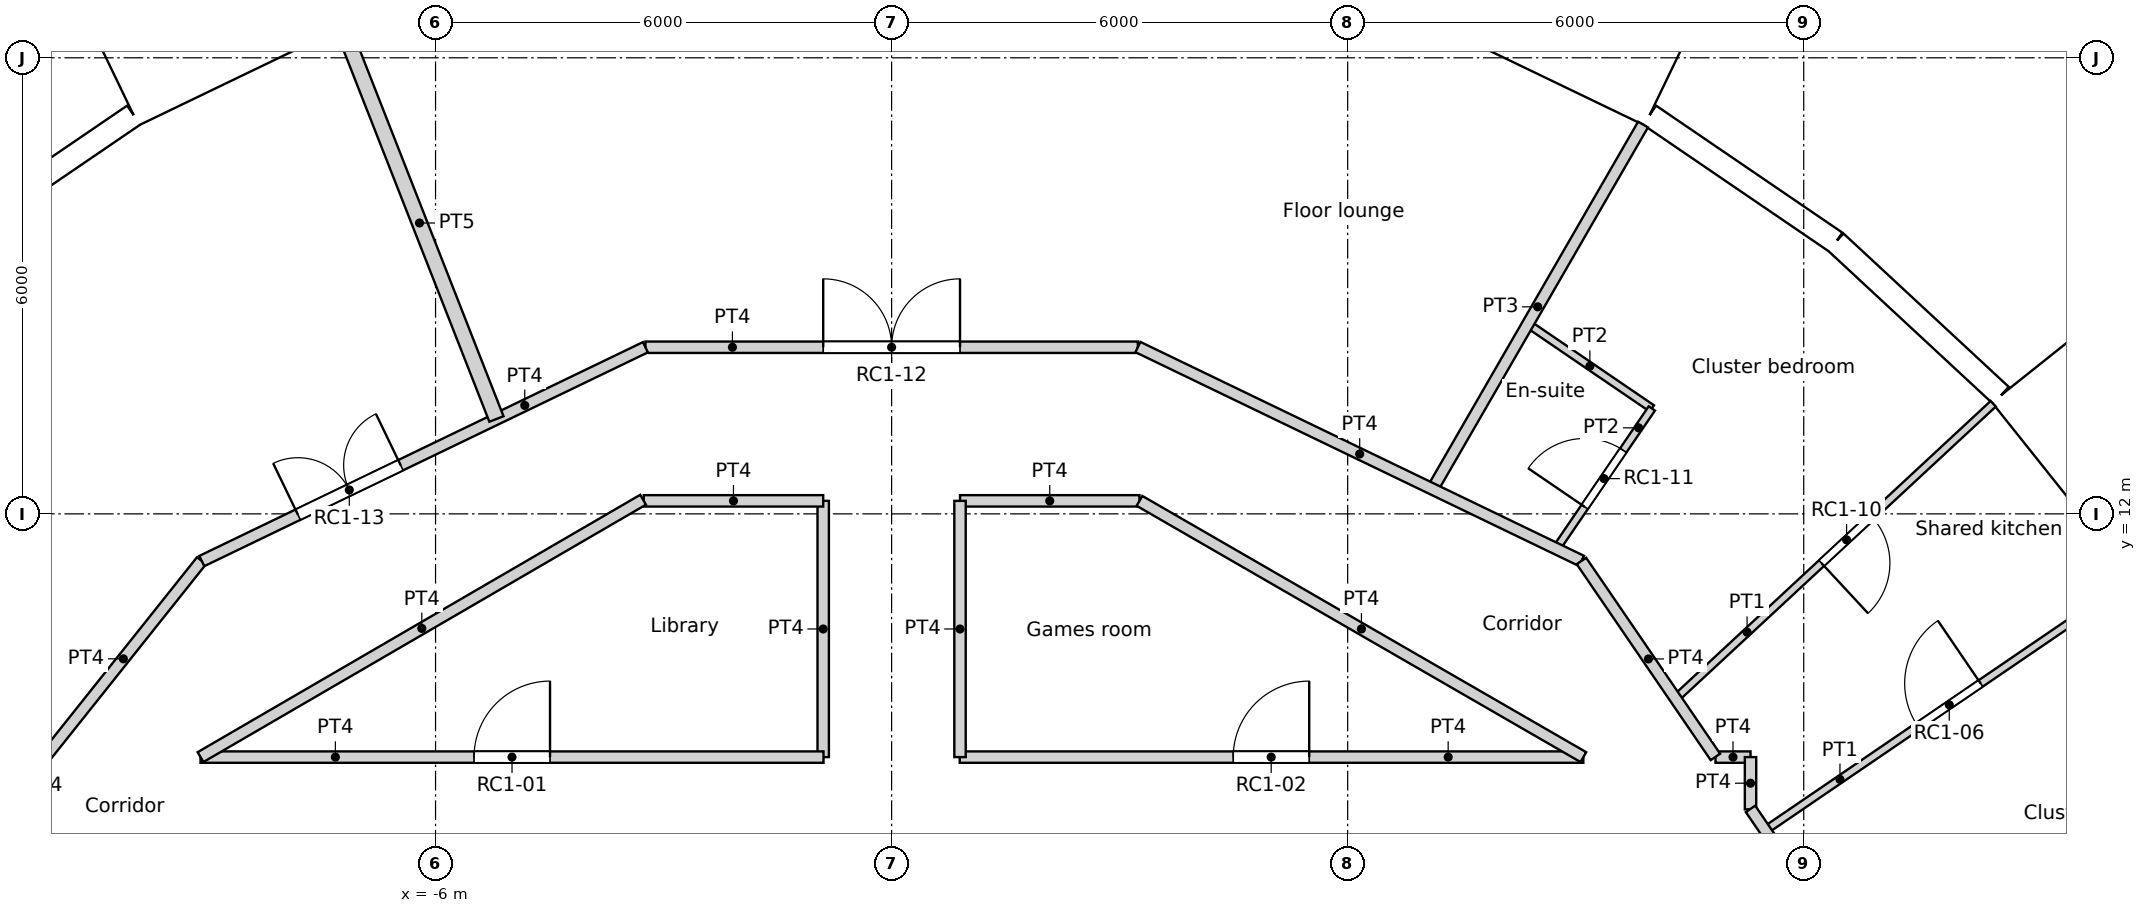
"""IFC4 building model, lengths in metres.
Left out: names, types, materials, properties, quantities, classifications, styles, units other than length and angle.
Written with IfcOpenShell. Run it as: python <this file> out.ifc"""

import sys

from ifc_helpers import new_model, si_unit, direction, frame, frame_2d, origin, origin_2d, place, context, subcontext, project, spatial, rectangle, circle, extrude, element, fill, save


model = new_model("IFC4")
c1 = context("Model", 3, precision=1e-05, world=origin(), true_north=direction((0.0, 1.0)))
c2 = subcontext(c1, "Body", "Model", "MODEL_VIEW")
j1 = project(units=[si_unit("LENGTHUNIT", "METRE"), si_unit("PLANEANGLEUNIT", "RADIAN")], contexts=[c1])
p1 = place(None, origin())
s1 = spatial("IfcSite", under=j1, at=p1, CompositionType="ELEMENT")
p2 = place(p1, origin())
s2 = spatial("IfcBuilding", under=s1, at=p2, CompositionType="ELEMENT")
p3 = place(p2, frame((0.0, 0.0, 231.0)))
s3 = spatial("IfcBuildingStorey", under=s2, at=p3, CompositionType="ELEMENT", Elevation=231.0)
for number, where, z_axis, x_axis in (
    (1, (15.552, 10.603, 0.0), (0.0, 0.0, 1.0), (1.0, 0.0, 0.0)),
    (2, (11.735, 14.716, 0.0), (0.0, 0.0, 1.0), (1.0, 0.0, 0.0)),
    (3, (6.876, 17.521, 0.0), (0.0, 0.0, 1.0), (1.0, 0.0, 0.0)),
    (4, (-4.188, 18.35, 0.0), (0.0, 0.0, 1.0), (1.0, 0.0, 0.0)),
    (5, (-9.411, 16.301, 0.0), (0.0, 0.0, 1.0), (1.0, 0.0, 0.0)),
):
    element("IfcColumn", number, at=place(p3, frame(where, z_axis=z_axis, x_axis=x_axis)), inside=s3, PredefinedType="COLUMN", context=c2, shape_type="SweptSolid", body=[
        extrude(circle(Radius=0.55, at=origin_2d()), origin(), (0.0, 0.0, 1.0), 3.6),
    ])
p4 = place(p3, frame((16.917, 11.572, -0.35), z_axis=(0.0, 0.0, 1.0), x_axis=(-0.623523286312, 0.781804778335, 0.0)))
e6 = element("IfcWall", 6, at=p4, inside=s3, PredefinedType="ELEMENTEDWALL", context=c2, shape_type="SweptSolid", body=[
    extrude(rectangle(XDim=3.0, YDim=1.45, at=frame_2d((1.5, 0.0))), origin(), (0.0, 0.0, 1.0), 3.6),
])
p5 = place(p4, frame((1.5, 0.0, 1.9)))
e7 = element("IfcOpeningElement", 7, at=p5, cuts=e6, PredefinedType="OPENING", context=c2, shape_type="SweptSolid", body=[
    extrude(circle(Radius=0.9, at=origin_2d()), frame((0.0, 0.735, 0.0), z_axis=(0.0, -1.0, 0.0), x_axis=(1.0, 0.0, 0.0)), (0.0, 0.0, 1.0), 1.47),
])
p6 = place(p3, frame((14.593, 13.561, 0.0), z_axis=(0.0, 0.0, 1.0), x_axis=(-0.733028283666, 0.680198158882, 0.0)))
e8 = element("IfcWall", 8, at=p6, inside=s3, PredefinedType="SOLIDWALL", context=c2, shape_type="SweptSolid", body=[
    extrude(rectangle(XDim=2.962, YDim=0.3, at=frame_2d((1.481, 0.0))), origin(), (0.0, 0.0, 1.0), 2.8),
])
p7 = place(p6, frame((1.481, 0.0, 1.55)))
e9 = element("IfcOpeningElement", 9, at=p7, cuts=e8, PredefinedType="OPENING", context=c2, shape_type="SweptSolid", body=[
    extrude(circle(Radius=0.9, at=origin_2d()), frame((0.0, 0.16, 0.0), z_axis=(0.0, -1.0, 0.0), x_axis=(1.0, 0.0, 0.0)), (0.0, 0.0, 1.0), 0.32),
])
p8 = place(p3, frame((12.421, 15.575, 0.0), z_axis=(0.0, 0.0, 1.0), x_axis=(-0.826236061068, 0.563324037646, 0.0)))
e10 = element("IfcWall", 10, at=p8, inside=s3, PredefinedType="SOLIDWALL", context=c2, shape_type="SweptSolid", body=[
    extrude(rectangle(XDim=2.962, YDim=0.3, at=frame_2d((1.481, 0.0))), origin(), (0.0, 0.0, 1.0), 3.25),
])
p9 = place(p8, frame((1.481, 0.0, 1.55)))
e11 = element("IfcOpeningElement", 11, at=p9, cuts=e10, PredefinedType="OPENING", context=c2, shape_type="SweptSolid", body=[
    extrude(circle(Radius=0.9, at=origin_2d()), frame((0.0, 0.16, 0.0), z_axis=(0.0, -1.0, 0.0), x_axis=(1.0, 0.0, 0.0)), (0.0, 0.0, 1.0), 0.32),
])
p10 = place(p3, frame((10.22, 17.766, -0.35), z_axis=(0.0, 0.0, 1.0), x_axis=(-0.900953362039, 0.433915935904, 0.0)))
e12 = element("IfcWall", 12, at=p10, inside=s3, PredefinedType="ELEMENTEDWALL", context=c2, shape_type="SweptSolid", body=[
    extrude(rectangle(XDim=3.0, YDim=1.45, at=frame_2d((1.5, 0.0))), origin(), (0.0, 0.0, 1.0), 3.6),
])
p11 = place(p10, frame((1.5, 0.0, 1.9)))
e13 = element("IfcOpeningElement", 13, at=p11, cuts=e12, PredefinedType="OPENING", context=c2, shape_type="SweptSolid", body=[
    extrude(circle(Radius=0.9, at=origin_2d()), frame((0.0, 0.735, 0.0), z_axis=(0.0, -1.0, 0.0), x_axis=(1.0, 0.0, 0.0)), (0.0, 0.0, 1.0), 1.47),
])
p12 = place(p3, frame((-7.518, 19.068, -0.35), z_axis=(0.0, 0.0, 1.0), x_axis=(-0.900953362039, -0.433915935904, 0.0)))
e14 = element("IfcWall", 14, at=p12, inside=s3, PredefinedType="ELEMENTEDWALL", context=c2, shape_type="SweptSolid", body=[
    extrude(rectangle(XDim=3.0, YDim=1.45, at=frame_2d((1.5, 0.0))), origin(), (0.0, 0.0, 1.0), 3.6),
])
p13 = place(p12, frame((1.5, 0.0, 1.9)))
e15 = element("IfcOpeningElement", 15, at=p13, cuts=e14, PredefinedType="OPENING", context=c2, shape_type="SweptSolid", body=[
    extrude(circle(Radius=0.9, at=origin_2d()), frame((0.0, 0.735, 0.0), z_axis=(0.0, -1.0, 0.0), x_axis=(1.0, 0.0, 0.0)), (0.0, 0.0, 1.0), 1.47),
])
p14 = place(p3, frame((-9.974, 17.244, 0.0), z_axis=(0.0, 0.0, 1.0), x_axis=(-0.826236061068, -0.563324037646, 0.0)))
e16 = element("IfcWall", 16, at=p14, inside=s3, PredefinedType="SOLIDWALL", context=c2, shape_type="SweptSolid", body=[
    extrude(rectangle(XDim=2.962, YDim=0.3, at=frame_2d((1.481, 0.0))), origin(), (0.0, 0.0, 1.0), 2.8),
])
p15 = place(p14, frame((1.481, 0.0, 1.55)))
e17 = element("IfcOpeningElement", 17, at=p15, cuts=e16, PredefinedType="OPENING", context=c2, shape_type="SweptSolid", body=[
    extrude(circle(Radius=0.9, at=origin_2d()), frame((0.0, 0.16, 0.0), z_axis=(0.0, -1.0, 0.0), x_axis=(1.0, 0.0, 0.0)), (0.0, 0.0, 1.0), 0.32),
])
p16 = place(p3, frame((-9.092, 8.8, 0.0), z_axis=(0.0, 0.0, 1.0), x_axis=(0.864470922103, 0.502682827277, 0.0)))
e18 = element("IfcWall", 18, at=p16, inside=s3, PredefinedType="PARTITIONING", context=c2, shape_type="SweptSolid", body=[
    extrude(rectangle(XDim=6.735, YDim=0.15, at=frame_2d((3.368, 0.0))), origin(), (0.0, 0.0, 1.0), 3.25),
])
p17 = place(p3, frame((-9.092, 8.8, 0.0), z_axis=(0.0, 0.0, 1.0), x_axis=(1.0, 0.0, 0.0)))
e19 = element("IfcWall", 19, at=p17, inside=s3, PredefinedType="PARTITIONING", context=c2, shape_type="SweptSolid", body=[
    extrude(rectangle(XDim=8.196, YDim=0.15, at=frame_2d((4.098, 0.0))), origin(), (0.0, 0.0, 1.0), 3.25),
])
p18 = place(p17, frame((3.598, 0.0, 0.0)))
e20 = element("IfcOpeningElement", 20, at=p18, cuts=e19, PredefinedType="OPENING", context=c2, shape_type="SweptSolid", body=[
    extrude(rectangle(XDim=1.0, YDim=2.04, at=frame_2d((0.5, 1.02))), frame((0.0, 0.075, 0.0), z_axis=(0.0, -1.0, 0.0), x_axis=(1.0, 0.0, 0.0)), (0.0, 0.0, 1.0), 0.15),
])
p19 = place(p3, frame((0.896, 8.8, 0.0), z_axis=(0.0, 0.0, 1.0), x_axis=(1.0, 0.0, 0.0)))
e21 = element("IfcWall", 21, at=p19, inside=s3, PredefinedType="PARTITIONING", context=c2, shape_type="SweptSolid", body=[
    extrude(rectangle(XDim=8.205, YDim=0.15, at=frame_2d((4.102, 0.0))), origin(), (0.0, 0.0, 1.0), 3.25),
])
p20 = place(p19, frame((3.598, 0.0, 0.0)))
e22 = element("IfcOpeningElement", 22, at=p20, cuts=e21, PredefinedType="OPENING", context=c2, shape_type="SweptSolid", body=[
    extrude(rectangle(XDim=1.0, YDim=2.04, at=frame_2d((0.5, 1.02))), frame((0.0, 0.075, 0.0), z_axis=(0.0, -1.0, 0.0), x_axis=(1.0, 0.0, 0.0)), (0.0, 0.0, 1.0), 0.15),
])
p21 = place(p3, frame((9.075, 11.381, 0.0), z_axis=(0.0, 0.0, 1.0), x_axis=(0.564277533473, -0.825585165333, 0.0)))
e23 = element("IfcWall", 23, at=p21, inside=s3, PredefinedType="PARTITIONING", context=c2, shape_type="SweptSolid", body=[
    extrude(rectangle(XDim=3.123, YDim=0.15, at=frame_2d((1.562, 0.0))), origin(), (0.0, 0.0, 1.0), 3.25),
])
p22 = place(p3, frame((10.839, 8.8, 0.0), z_axis=(0.0, 0.0, 1.0), x_axis=(1.0, 0.0, 0.0)))
e24 = element("IfcWall", 24, at=p22, inside=s3, PredefinedType="PARTITIONING", context=c2, shape_type="SweptSolid", body=[
    extrude(rectangle(XDim=0.461, YDim=0.15, at=frame_2d((0.23, 0.0))), origin(), (0.0, 0.0, 1.0), 3.25),
])
p23 = place(p3, frame((11.3, 8.113, 0.0), z_axis=(0.0, 0.0, 1.0), x_axis=(0.0, 1.0, 0.0)))
e25 = element("IfcWall", 25, at=p23, inside=s3, PredefinedType="PARTITIONING", context=c2, shape_type="SweptSolid", body=[
    extrude(rectangle(XDim=0.687, YDim=0.15, at=frame_2d((0.344, 0.0))), origin(), (0.0, 0.0, 1.0), 3.25),
])
p24 = place(p3, frame((-11.136, 8.802, 0.0), z_axis=(0.0, 0.0, 1.0), x_axis=(0.623151397235, 0.782101231379, 0.0)))
e26 = element("IfcWall", 26, at=p24, inside=s3, PredefinedType="PARTITIONING", context=c2, shape_type="SweptSolid", body=[
    extrude(rectangle(XDim=3.301, YDim=0.15, at=frame_2d((1.65, 0.0))), origin(), (0.0, 0.0, 1.0), 3.25),
])
p25 = place(p3, frame((11.3, 8.119, 0.0), z_axis=(0.0, 0.0, 1.0), x_axis=(0.56348561488, -0.82612587529, 0.0)))
e27 = element("IfcWall", 27, at=p25, inside=s3, PredefinedType="PARTITIONING", context=c2, shape_type="SweptSolid", body=[
    extrude(rectangle(XDim=4.633, YDim=0.15, at=frame_2d((2.316, 0.0))), origin(), (0.0, 0.0, 1.0), 3.25),
])
p26 = place(p25, frame((1.413, 0.0, 0.0)))
e28 = element("IfcOpeningElement", 28, at=p26, cuts=e27, PredefinedType="OPENING", context=c2, shape_type="SweptSolid", body=[
    extrude(rectangle(XDim=1.1, YDim=2.1, at=frame_2d((0.55, 1.05))), frame((0.0, 0.075, 0.0), z_axis=(0.0, -1.0, 0.0), x_axis=(1.0, 0.0, 0.0)), (0.0, 0.0, 1.0), 0.15),
])
p27 = place(p3, frame((-0.9, 8.8, 0.0), z_axis=(0.0, 0.0, 1.0), x_axis=(0.0, 1.0, 0.0)))
e29 = element("IfcWall", 29, at=p27, inside=s3, PredefinedType="PARTITIONING", context=c2, shape_type="SweptSolid", body=[
    extrude(rectangle(XDim=3.371, YDim=0.15, at=frame_2d((1.686, 0.0))), origin(), (0.0, 0.0, 1.0), 3.25),
])
p28 = place(p3, frame((-3.261, 12.171, 0.0), z_axis=(0.0, 0.0, 1.0), x_axis=(1.0, 0.0, 0.0)))
e30 = element("IfcWall", 30, at=p28, inside=s3, PredefinedType="PARTITIONING", context=c2, shape_type="SweptSolid", body=[
    extrude(rectangle(XDim=2.361, YDim=0.15, at=frame_2d((1.181, 0.0))), origin(), (0.0, 0.0, 1.0), 3.25),
])
p29 = place(p3, frame((3.261, 12.171, 0.0), z_axis=(0.0, 0.0, 1.0), x_axis=(0.866066809554, -0.499928276245, 0.0)))
e31 = element("IfcWall", 31, at=p29, inside=s3, PredefinedType="PARTITIONING", context=c2, shape_type="SweptSolid", body=[
    extrude(rectangle(XDim=6.743, YDim=0.15, at=frame_2d((3.371, 0.0))), origin(), (0.0, 0.0, 1.0), 3.25),
])
p30 = place(p3, frame((0.9, 12.171, 0.0), z_axis=(0.0, 0.0, 1.0), x_axis=(1.0, 0.0, 0.0)))
e32 = element("IfcWall", 32, at=p30, inside=s3, PredefinedType="PARTITIONING", context=c2, shape_type="SweptSolid", body=[
    extrude(rectangle(XDim=2.361, YDim=0.15, at=frame_2d((1.181, 0.0))), origin(), (0.0, 0.0, 1.0), 3.25),
])
p31 = place(p3, frame((0.9, 8.8, 0.0), z_axis=(0.0, 0.0, 1.0), x_axis=(0.0, 1.0, 0.0)))
e33 = element("IfcWall", 33, at=p31, inside=s3, PredefinedType="PARTITIONING", context=c2, shape_type="SweptSolid", body=[
    extrude(rectangle(XDim=3.371, YDim=0.15, at=frame_2d((1.686, 0.0))), origin(), (0.0, 0.0, 1.0), 3.25),
])
p32 = place(p3, frame((3.24, 14.195, 0.0), z_axis=(0.0, 0.0, 1.0), x_axis=(0.900778421649, -0.434278983018, 0.0)))
e34 = element("IfcWall", 34, at=p32, inside=s3, PredefinedType="PARTITIONING", context=c2, shape_type="SweptSolid", body=[
    extrude(rectangle(XDim=6.479, YDim=0.15, at=frame_2d((3.239, 0.0))), origin(), (0.0, 0.0, 1.0), 3.25),
])
p33 = place(p3, frame((-9.075, 11.379, 0.0), z_axis=(0.0, 0.0, 1.0), x_axis=(0.900851590682, 0.434127183629, 0.0)))
e35 = element("IfcWall", 35, at=p33, inside=s3, PredefinedType="PARTITIONING", context=c2, shape_type="SweptSolid", body=[
    extrude(rectangle(XDim=6.479, YDim=0.15, at=frame_2d((3.239, 0.0))), origin(), (0.0, 0.0, 1.0), 3.25),
])
p34 = place(p33, frame((1.404, 0.0, 0.0)))
e36 = element("IfcOpeningElement", 36, at=p34, cuts=e35, PredefinedType="OPENING", context=c2, shape_type="SweptSolid", body=[
    extrude(rectangle(XDim=1.5, YDim=2.1, at=frame_2d((0.75, 1.05))), frame((0.0, 0.075, 0.0), z_axis=(0.0, -1.0, 0.0), x_axis=(1.0, 0.0, 0.0)), (0.0, 0.0, 1.0), 0.15),
])
p35 = place(p3, frame((-3.239, 14.192, 0.0), z_axis=(0.0, 0.0, 1.0), x_axis=(1.0, 0.0, 0.0)))
e37 = element("IfcWall", 37, at=p35, inside=s3, PredefinedType="PARTITIONING", context=c2, shape_type="SweptSolid", body=[
    extrude(rectangle(XDim=6.478, YDim=0.15, at=frame_2d((3.239, 0.0))), origin(), (0.0, 0.0, 1.0), 3.25),
])
p36 = place(p35, frame((2.339, 0.0, 0.0)))
e38 = element("IfcOpeningElement", 38, at=p36, cuts=e37, PredefinedType="OPENING", context=c2, shape_type="SweptSolid", body=[
    extrude(rectangle(XDim=1.8, YDim=2.1, at=frame_2d((0.9, 1.05))), frame((0.0, 0.075, 0.0), z_axis=(0.0, -1.0, 0.0), x_axis=(1.0, 0.0, 0.0)), (0.0, 0.0, 1.0), 0.15),
])
p37 = place(p3, frame((11.493, 7.836, 0.0), z_axis=(0.0, 0.0, 1.0), x_axis=(0.826231748746, 0.563330362544, 0.0)))
e39 = element("IfcWall", 39, at=p37, inside=s3, PredefinedType="PARTITIONING", context=c2, shape_type="SweptSolid", body=[
    extrude(rectangle(XDim=5.862, YDim=0.1, at=frame_2d((2.931, 0.0))), origin(), (0.0, 0.0, 1.0), 3.25),
])
p38 = place(p37, frame((2.431, 0.0, 0.0)))
e40 = element("IfcOpeningElement", 40, at=p38, cuts=e39, PredefinedType="OPENING", context=c2, shape_type="SweptSolid", body=[
    extrude(rectangle(XDim=1.0, YDim=2.04, at=frame_2d((0.5, 1.02))), frame((0.0, 0.05, 0.0), z_axis=(0.0, -1.0, 0.0), x_axis=(1.0, 0.0, 0.0)), (0.0, 0.0, 1.0), 0.1),
])
p39 = place(p3, frame((10.312, 9.568, 0.0), z_axis=(0.0, 0.0, 1.0), x_axis=(0.733002312561, 0.680226146057, 0.0)))
e41 = element("IfcWall", 41, at=p39, inside=s3, PredefinedType="PARTITIONING", context=c2, shape_type="SweptSolid", body=[
    extrude(rectangle(XDim=5.704, YDim=0.1, at=frame_2d((2.852, 0.0))), origin(), (0.0, 0.0, 1.0), 3.25),
])
p40 = place(p39, frame((2.622, 0.0, 0.0)))
e42 = element("IfcOpeningElement", 42, at=p40, cuts=e41, PredefinedType="OPENING", context=c2, shape_type="SweptSolid", body=[
    extrude(rectangle(XDim=0.9, YDim=2.1, at=frame_2d((0.45, 1.05))), frame((0.0, 0.05, 0.0), z_axis=(0.0, -1.0, 0.0), x_axis=(1.0, 0.0, 0.0)), (0.0, 0.0, 1.0), 0.1),
])
p41 = place(p3, frame((8.743, 11.541, 0.0), z_axis=(0.0, 0.0, 1.0), x_axis=(0.563469042551, 0.826137178734, 0.0)))
e43 = element("IfcWall", 43, at=p41, inside=s3, PredefinedType="PARTITIONING", context=c2, shape_type="SweptSolid", body=[
    extrude(rectangle(XDim=2.234, YDim=0.1, at=frame_2d((1.117, 0.0))), origin(), (0.0, 0.0, 1.0), 3.25),
])
p42 = place(p41, frame((0.667, 0.0, 0.0)))
e44 = element("IfcOpeningElement", 44, at=p42, cuts=e43, PredefinedType="OPENING", context=c2, shape_type="SweptSolid", body=[
    extrude(rectangle(XDim=0.9, YDim=2.04, at=frame_2d((0.45, 1.02))), frame((0.0, 0.05, 0.0), z_axis=(0.0, -1.0, 0.0), x_axis=(1.0, 0.0, 0.0)), (0.0, 0.0, 1.0), 0.1),
])
p43 = place(p3, frame((8.371, 14.499, 0.0), z_axis=(0.0, 0.0, 1.0), x_axis=(0.82620117489, -0.563375202339, 0.0)))
e45 = element("IfcWall", 45, at=p43, inside=s3, PredefinedType="PARTITIONING", context=c2, shape_type="SweptSolid", body=[
    extrude(rectangle(XDim=1.974, YDim=0.1, at=frame_2d((0.987, 0.0))), origin(), (0.0, 0.0, 1.0), 3.25),
])
p44 = place(p3, frame((7.115, 12.325, 0.0), z_axis=(0.0, 0.0, 1.0), x_axis=(0.500139547481, 0.865944821017, 0.0)))
e46 = element("IfcWall", 46, at=p44, inside=s3, PredefinedType="PARTITIONING", context=c2, shape_type="SweptSolid", body=[
    extrude(rectangle(XDim=5.54, YDim=0.15, at=frame_2d((2.77, 0.0))), origin(), (0.0, 0.0, 1.0), 3.25),
])
p45 = place(p3, frame((-7.223, 18.405, 0.0), z_axis=(0.0, 0.0, 1.0), x_axis=(0.365334662456, -0.930876245485, 0.0)))
e47 = element("IfcWall", 47, at=p45, inside=s3, PredefinedType="PARTITIONING", context=c2, shape_type="SweptSolid", body=[
    extrude(rectangle(XDim=5.54, YDim=0.2, at=frame_2d((2.77, 0.0))), origin(), (0.0, 0.0, 1.0), 3.25),
])
p46 = place(p5, origin())
e48 = element("IfcWindow", 48, at=p46, inside=s3, PartitioningType="SINGLE_PANEL", PredefinedType="WINDOW", context=c2, shape_type="SweptSolid", body=[
    extrude(circle(Radius=0.9, at=origin_2d()), frame((0.0, 0.695, 0.0), z_axis=(0.0, -1.0, 0.0), x_axis=(1.0, 0.0, 0.0)), (0.0, 0.0, 1.0), 0.1),
])
fill(e7, e48)
p47 = place(p7, origin())
e49 = element("IfcWindow", 49, at=p47, inside=s3, PartitioningType="SINGLE_PANEL", PredefinedType="WINDOW", context=c2, shape_type="SweptSolid", body=[
    extrude(circle(Radius=0.9, at=origin_2d()), frame((0.0, 0.12, 0.0), z_axis=(0.0, -1.0, 0.0), x_axis=(1.0, 0.0, 0.0)), (0.0, 0.0, 1.0), 0.1),
])
fill(e9, e49)
p48 = place(p9, origin())
e50 = element("IfcWindow", 50, at=p48, inside=s3, PartitioningType="SINGLE_PANEL", PredefinedType="WINDOW", context=c2, shape_type="SweptSolid", body=[
    extrude(circle(Radius=0.9, at=origin_2d()), frame((0.0, 0.12, 0.0), z_axis=(0.0, -1.0, 0.0), x_axis=(1.0, 0.0, 0.0)), (0.0, 0.0, 1.0), 0.1),
])
fill(e11, e50)
p49 = place(p11, origin())
e51 = element("IfcWindow", 51, at=p49, inside=s3, PartitioningType="SINGLE_PANEL", PredefinedType="WINDOW", context=c2, shape_type="SweptSolid", body=[
    extrude(circle(Radius=0.9, at=origin_2d()), frame((0.0, 0.695, 0.0), z_axis=(0.0, -1.0, 0.0), x_axis=(1.0, 0.0, 0.0)), (0.0, 0.0, 1.0), 0.1),
])
fill(e13, e51)
p50 = place(p13, origin())
e52 = element("IfcWindow", 52, at=p50, inside=s3, PartitioningType="SINGLE_PANEL", PredefinedType="WINDOW", context=c2, shape_type="SweptSolid", body=[
    extrude(circle(Radius=0.9, at=origin_2d()), frame((0.0, 0.695, 0.0), z_axis=(0.0, -1.0, 0.0), x_axis=(1.0, 0.0, 0.0)), (0.0, 0.0, 1.0), 0.1),
])
fill(e15, e52)
p51 = place(p15, origin())
e53 = element("IfcWindow", 53, at=p51, inside=s3, PartitioningType="SINGLE_PANEL", PredefinedType="WINDOW", context=c2, shape_type="SweptSolid", body=[
    extrude(circle(Radius=0.9, at=origin_2d()), frame((0.0, 0.12, 0.0), z_axis=(0.0, -1.0, 0.0), x_axis=(1.0, 0.0, 0.0)), (0.0, 0.0, 1.0), 0.1),
])
fill(e17, e53)
p52 = place(p18, origin())
e54 = element("IfcDoor", 54, at=p52, inside=s3, OperationType="SINGLE_SWING_RIGHT", PredefinedType="DOOR", context=c2, shape_type="SweptSolid", body=[
    extrude(rectangle(XDim=1.0, YDim=2.04, at=frame_2d((0.5, 1.02))), frame((0.0, 0.025, 0.0), z_axis=(0.0, -1.0, 0.0), x_axis=(1.0, 0.0, 0.0)), (0.0, 0.0, 1.0), 0.05),
])
fill(e20, e54)
p53 = place(p20, origin())
e55 = element("IfcDoor", 55, at=p53, inside=s3, OperationType="SINGLE_SWING_RIGHT", PredefinedType="DOOR", context=c2, shape_type="SweptSolid", body=[
    extrude(rectangle(XDim=1.0, YDim=2.04, at=frame_2d((0.5, 1.02))), frame((0.0, 0.025, 0.0), z_axis=(0.0, -1.0, 0.0), x_axis=(1.0, 0.0, 0.0)), (0.0, 0.0, 1.0), 0.05),
])
fill(e22, e55)
p54 = place(p38, origin())
e56 = element("IfcDoor", 56, at=p54, inside=s3, OperationType="SINGLE_SWING_RIGHT", PredefinedType="DOOR", context=c2, shape_type="SweptSolid", body=[
    extrude(rectangle(XDim=1.0, YDim=2.04, at=frame_2d((0.5, 1.02))), frame((0.0, 0.025, 0.0), z_axis=(0.0, -1.0, 0.0), x_axis=(1.0, 0.0, 0.0)), (0.0, 0.0, 1.0), 0.05),
])
fill(e40, e56)
p55 = place(p40, origin())
e57 = element("IfcDoor", 57, at=p55, inside=s3, OperationType="SINGLE_SWING_RIGHT", PredefinedType="DOOR", context=c2, shape_type="SweptSolid", body=[
    extrude(rectangle(XDim=0.9, YDim=2.1, at=frame_2d((0.45, 1.05))), frame((0.0, 0.025, 0.0), z_axis=(0.0, -1.0, 0.0), x_axis=(1.0, 0.0, 0.0)), (0.0, 0.0, 1.0), 0.05),
])
fill(e42, e57)
p56 = place(p42, origin())
e58 = element("IfcDoor", 58, at=p56, inside=s3, OperationType="SINGLE_SWING_LEFT", PredefinedType="DOOR", context=c2, shape_type="SweptSolid", body=[
    extrude(rectangle(XDim=0.9, YDim=2.04, at=frame_2d((0.45, 1.02))), frame((0.0, 0.025, 0.0), z_axis=(0.0, -1.0, 0.0), x_axis=(1.0, 0.0, 0.0)), (0.0, 0.0, 1.0), 0.05),
])
fill(e44, e58)
p57 = place(p36, origin())
e59 = element("IfcDoor", 59, at=p57, inside=s3, OperationType="DOUBLE_DOOR_SINGLE_SWING", PredefinedType="DOOR", context=c2, shape_type="SweptSolid", body=[
    extrude(rectangle(XDim=1.8, YDim=2.1, at=frame_2d((0.9, 1.05))), frame((0.0, 0.025, 0.0), z_axis=(0.0, -1.0, 0.0), x_axis=(1.0, 0.0, 0.0)), (0.0, 0.0, 1.0), 0.05),
])
fill(e38, e59)
p58 = place(p34, origin())
e60 = element("IfcDoor", 60, at=p58, inside=s3, OperationType="DOUBLE_DOOR_SINGLE_SWING", PredefinedType="DOOR", context=c2, shape_type="SweptSolid", body=[
    extrude(rectangle(XDim=1.5, YDim=2.1, at=frame_2d((0.75, 1.05))), frame((0.0, 0.025, 0.0), z_axis=(0.0, -1.0, 0.0), x_axis=(1.0, 0.0, 0.0)), (0.0, 0.0, 1.0), 0.05),
])
fill(e36, e60)
save(model, sys.argv[1])
